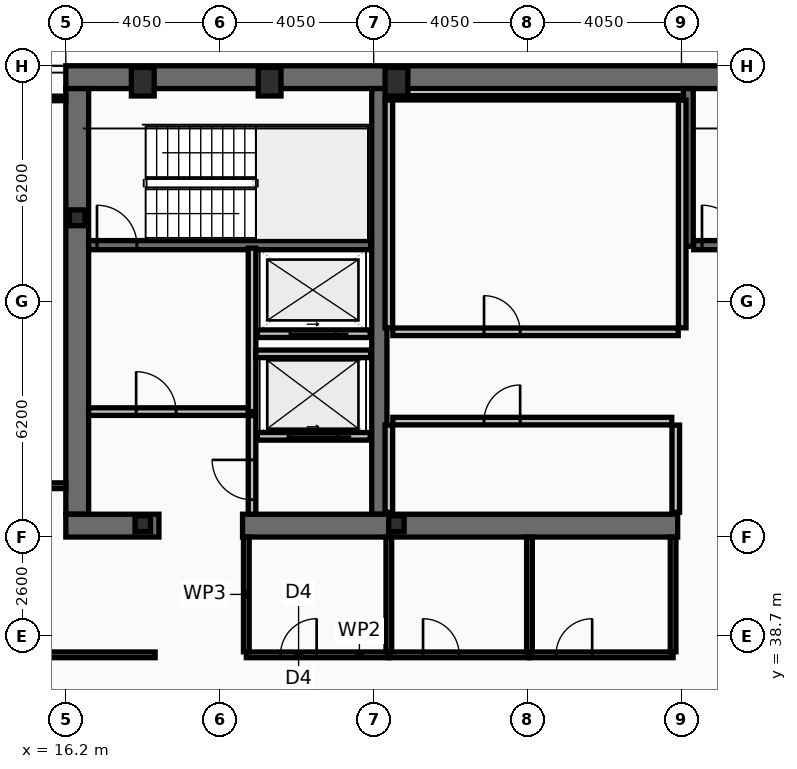
"""IFC4 building model, lengths in metres.
Left out: names, types, materials, properties, quantities, classifications, styles, units other than length and angle.
Written with IfcOpenShell. Run it as: python <this file> out.ifc"""

import sys

from ifc_helpers import new_model, si_unit, direction, frame, frame_2d, origin, origin_2d, place, context, subcontext, project, spatial, rectangle, hollow_rectangle, i_section, extrude, element, fill, save


model = new_model("IFC4")
c1 = context("Model", 3, precision=1e-05, world=origin(), true_north=direction((0.0, 1.0)))
c2 = subcontext(c1, "Body", "Model", "MODEL_VIEW")
j1 = project(units=[si_unit("LENGTHUNIT", "METRE"), si_unit("PLANEANGLEUNIT", "RADIAN")], contexts=[c1])
p1 = place(None, origin())
s1 = spatial("IfcSite", under=j1, at=p1, CompositionType="ELEMENT")
p2 = place(p1, origin())
s2 = spatial("IfcBuilding", under=s1, at=p2, CompositionType="ELEMENT")
p3 = place(p2, frame((0.0, 0.0, 228.2)))
s3 = spatial("IfcBuildingStorey", under=s2, at=p3, CompositionType="ELEMENT", Elevation=228.2)
p4 = place(p3, frame((16.2, 53.4, 0.0), z_axis=(0.0, 0.0, 1.0), x_axis=(1.0, 0.0, 0.0)))
e1 = element("IfcWall", 1, at=p4, inside=s3, PredefinedType="SHEAR", context=c2, shape_type="SweptSolid", body=[
    extrude(rectangle(XDim=40.5, YDim=0.6, at=frame_2d((20.25, 0.0))), origin(), (0.0, 0.0, 1.0), 3.44),
])
p5 = place(p3, frame((16.5, 41.9, 0.0), z_axis=(0.0, 0.0, 1.0), x_axis=(0.0, 1.0, 0.0)))
e2 = element("IfcWall", 2, at=p5, inside=s3, PredefinedType="SHEAR", context=c2, shape_type="SweptSolid", body=[
    extrude(rectangle(XDim=11.2, YDim=0.6, at=frame_2d((5.6, 0.0))), origin(), (0.0, 0.0, 1.0), 3.44),
])
p6 = place(p3, frame((24.45, 41.9, 0.0), z_axis=(0.0, 0.0, 1.0), x_axis=(0.0, 1.0, 0.0)))
e3 = element("IfcWall", 3, at=p6, inside=s3, PredefinedType="SHEAR", context=c2, shape_type="SweptSolid", body=[
    extrude(rectangle(XDim=11.2, YDim=0.4, at=frame_2d((5.6, 0.0))), origin(), (0.0, 0.0, 1.0), 3.44),
])
p7 = place(p3, frame((18.65, 41.6, 0.0), z_axis=(0.0, 0.0, 1.0), x_axis=(-1.0, 0.0, 0.0)))
e4 = element("IfcWall", 4, at=p7, inside=s3, PredefinedType="SHEAR", context=c2, shape_type="SweptSolid", body=[
    extrude(rectangle(XDim=2.45, YDim=0.6, at=frame_2d((1.225, 0.0))), origin(), (0.0, 0.0, 1.0), 3.44),
])
p8 = place(p3, frame((32.3, 41.6, 0.0), z_axis=(0.0, 0.0, 1.0), x_axis=(-1.0, 0.0, 0.0)))
e5 = element("IfcWall", 5, at=p8, inside=s3, PredefinedType="SHEAR", context=c2, shape_type="SweptSolid", body=[
    extrude(rectangle(XDim=11.45, YDim=0.6, at=frame_2d((5.725, 0.0))), origin(), (0.0, 0.0, 1.0), 3.44),
])
p9 = place(p3, frame((32.58, 48.95, 0.0), z_axis=(0.0, 0.0, 1.0), x_axis=(0.0, 1.0, 0.0)))
e6 = element("IfcWall", 6, at=p9, inside=s3, PredefinedType="SHEAR", context=c2, shape_type="SweptSolid", body=[
    extrude(rectangle(XDim=4.15, YDim=0.26, at=frame_2d((2.075, 0.0))), origin(), (0.0, 0.0, 1.0), 3.44),
])
p10 = place(p3, frame((16.8, 48.98, 0.0), z_axis=(0.0, 0.0, 1.0), x_axis=(1.0, 0.0, 0.0)))
e7 = element("IfcWall", 7, at=p10, inside=s3, PredefinedType="SHEAR", context=c2, shape_type="SweptSolid", body=[
    extrude(rectangle(XDim=7.42, YDim=0.24, at=frame_2d((3.71, 0.0))), origin(), (0.0, 0.0, 1.0), 3.44),
])
p11 = place(p10, frame((0.22, 0.0, 0.0)))
e8 = element("IfcOpeningElement", 8, at=p11, cuts=e7, PredefinedType="OPENING", context=c2, shape_type="SweptSolid", body=[
    extrude(rectangle(XDim=1.05, YDim=2.15, at=frame_2d((0.525, 1.075))), frame((0.0, 0.13, 0.0), z_axis=(0.0, -1.0, 0.0), x_axis=(1.0, 0.0, 0.0)), (0.0, 0.0, 1.0), 0.26),
])
p12 = place(p3, frame((32.72, 48.98, 0.0), z_axis=(0.0, 0.0, 1.0), x_axis=(1.0, 0.0, 0.0)))
e9 = element("IfcWall", 9, at=p12, inside=s3, PredefinedType="SHEAR", context=c2, shape_type="SweptSolid", body=[
    extrude(rectangle(XDim=7.56, YDim=0.24, at=frame_2d((3.78, 0.0))), origin(), (0.0, 0.0, 1.0), 3.44),
])
p13 = place(p12, frame((0.22, 0.0, 0.0)))
e10 = element("IfcOpeningElement", 10, at=p13, cuts=e9, PredefinedType="OPENING", context=c2, shape_type="SweptSolid", body=[
    extrude(rectangle(XDim=1.05, YDim=2.15, at=frame_2d((0.525, 1.075))), frame((0.0, 0.13, 0.0), z_axis=(0.0, -1.0, 0.0), x_axis=(1.0, 0.0, 0.0)), (0.0, 0.0, 1.0), 0.26),
])
for number, where, z_axis, x_axis in (
    (11, (18.225, 53.28, 0.0), (0.0, 0.0, 1.0), (1.0, 0.0, 0.0)),
    (12, (21.562, 53.28, 0.0), (0.0, 0.0, 1.0), (1.0, 0.0, 0.0)),
    (13, (24.9, 53.28, 0.0), (0.0, 0.0, 1.0), (1.0, 0.0, 0.0)),
):
    element("IfcColumn", number, at=place(p3, frame(where, z_axis=z_axis, x_axis=x_axis)), inside=s3, PredefinedType="COLUMN", context=c2, shape_type="SweptSolid", body=[
        extrude(hollow_rectangle(XDim=0.6, YDim=0.75, WallThickness=0.045, at=origin_2d()), origin(), (0.0, 0.0, 1.0), 3.6),
    ])
for number, where, z_axis, x_axis in (
    (14, (16.5, 49.7, 0.0), (0.0, 0.0, 1.0), (1.0, 0.0, 0.0)),
    (15, (18.225, 41.65, 0.0), (0.0, 0.0, 1.0), (1.0, 0.0, 0.0)),
    (16, (24.9, 41.65, 0.0), (0.0, 0.0, 1.0), (1.0, 0.0, 0.0)),
):
    element("IfcColumn", number, at=place(p3, frame(where, z_axis=z_axis, x_axis=x_axis)), inside=s3, PredefinedType="COLUMN", context=c2, shape_type="SweptSolid", body=[
        extrude(i_section(OverallWidth=0.406, OverallDepth=0.416, WebThickness=0.03, FlangeThickness=0.048, at=origin_2d()), origin(), (0.0, 0.0, 1.0), 3.6),
    ])
p14 = place(p3, frame((24.21, 43.95, 0.0), z_axis=(0.0, 0.0, 1.0), x_axis=(-1.0, 0.0, 0.0)))
e17 = element("IfcWall", 17, at=p14, inside=s3, PredefinedType="PARTITIONING", context=c2, shape_type="SweptSolid", body=[
    extrude(rectangle(XDim=2.97, YDim=0.2, at=frame_2d((1.485, 0.0))), origin(), (0.0, 0.0, 1.0), 3.44),
])
p15 = place(p14, frame((0.86, 0.0, 0.0)))
e18 = element("IfcOpeningElement", 18, at=p15, cuts=e17, PredefinedType="OPENING", context=c2, shape_type="SweptSolid", body=[
    extrude(rectangle(XDim=1.3, YDim=2.18, at=frame_2d((0.65, 1.09))), frame((0.0, 0.11, 0.0), z_axis=(0.0, -1.0, 0.0), x_axis=(1.0, 0.0, 0.0)), (0.0, 0.0, 1.0), 0.22),
])
p16 = place(p3, frame((24.21, 46.65, 0.0), z_axis=(0.0, 0.0, 1.0), x_axis=(-1.0, 0.0, 0.0)))
e19 = element("IfcWall", 19, at=p16, inside=s3, PredefinedType="PARTITIONING", context=c2, shape_type="SweptSolid", body=[
    extrude(rectangle(XDim=2.97, YDim=0.2, at=frame_2d((1.485, 0.0))), origin(), (0.0, 0.0, 1.0), 3.44),
])
p17 = place(p16, frame((0.91, 0.0, 0.0)))
e20 = element("IfcOpeningElement", 20, at=p17, cuts=e19, PredefinedType="OPENING", context=c2, shape_type="SweptSolid", body=[
    extrude(rectangle(XDim=1.2, YDim=2.18, at=frame_2d((0.6, 1.09))), frame((0.0, 0.11, 0.0), z_axis=(0.0, -1.0, 0.0), x_axis=(1.0, 0.0, 0.0)), (0.0, 0.0, 1.0), 0.22),
])
p18 = place(p3, frame((21.1, 44.6, 0.0), z_axis=(0.0, 0.0, 1.0), x_axis=(0.0, 1.0, 0.0)))
e21 = element("IfcWall", 21, at=p18, inside=s3, PredefinedType="PARTITIONING", context=c2, shape_type="SweptSolid", body=[
    extrude(rectangle(XDim=4.3, YDim=0.2, at=frame_2d((2.15, 0.0))), origin(), (0.0, 0.0, 1.0), 3.44),
])
p19 = place(p3, frame((16.8, 44.6, 0.0), z_axis=(0.0, 0.0, 1.0), x_axis=(1.0, 0.0, 0.0)))
e22 = element("IfcWall", 22, at=p19, inside=s3, PredefinedType="PARTITIONING", context=c2, shape_type="SweptSolid", body=[
    extrude(rectangle(XDim=4.2, YDim=0.2, at=frame_2d((2.1, 0.0))), origin(), (0.0, 0.0, 1.0), 3.44),
])
p20 = place(p19, frame((1.25, 0.0, 0.0)))
e23 = element("IfcOpeningElement", 23, at=p20, cuts=e22, PredefinedType="OPENING", context=c2, shape_type="SweptSolid", body=[
    extrude(rectangle(XDim=1.05, YDim=2.15, at=frame_2d((0.525, 1.075))), frame((0.0, 0.11, 0.0), z_axis=(0.0, -1.0, 0.0), x_axis=(1.0, 0.0, 0.0)), (0.0, 0.0, 1.0), 0.22),
])
p21 = place(p3, frame((21.2, 46.12, 0.0), z_axis=(0.0, 0.0, 1.0), x_axis=(1.0, 0.0, 0.0)))
e24 = element("IfcWall", 24, at=p21, inside=s3, PredefinedType="PARTITIONING", context=c2, shape_type="SweptSolid", body=[
    extrude(rectangle(XDim=3.02, YDim=0.2, at=frame_2d((1.51, 0.0))), origin(), (0.0, 0.0, 1.0), 3.44),
])
p22 = place(p3, frame((21.1, 41.9, 0.0), z_axis=(0.0, 0.0, 1.0), x_axis=(0.0, 1.0, 0.0)))
e25 = element("IfcWall", 25, at=p22, inside=s3, PredefinedType="PARTITIONING", context=c2, shape_type="SweptSolid", body=[
    extrude(rectangle(XDim=2.595, YDim=0.2, at=frame_2d((1.298, 0.0))), origin(), (0.0, 0.0, 1.0), 3.44),
])
p23 = place(p22, frame((0.38, 0.0, 0.0)))
e26 = element("IfcOpeningElement", 26, at=p23, cuts=e25, PredefinedType="OPENING", context=c2, shape_type="SweptSolid", body=[
    extrude(rectangle(XDim=1.05, YDim=2.15, at=frame_2d((0.525, 1.075))), frame((0.0, 0.11, 0.0), z_axis=(0.0, -1.0, 0.0), x_axis=(1.0, 0.0, 0.0)), (0.0, 0.0, 1.0), 0.22),
])
for number, where, z_axis, x_axis in (
    (27, (24.7, 46.805, 0.0), (0.0, 0.0, 1.0), (0.0, 1.0, 0.0)),
    (28, (32.42, 46.805, 0.0), (0.0, 0.0, 1.0), (0.0, 1.0, 0.0)),
):
    element("IfcWall", number, at=place(p3, frame(where, z_axis=z_axis, x_axis=x_axis)), inside=s3, PredefinedType="PARTITIONING", context=c2, shape_type="SweptSolid", body=[
        extrude(rectangle(XDim=5.99, YDim=0.2, at=frame_2d((2.995, 0.0))), origin(), (0.0, 0.0, 1.0), 3.44),
    ])
p24 = place(p3, frame((24.805, 52.86, 0.0), z_axis=(0.0, 0.0, 1.0), x_axis=(1.0, 0.0, 0.0)))
e29 = element("IfcWall", 29, at=p24, inside=s3, PredefinedType="PARTITIONING", context=c2, shape_type="SweptSolid", body=[
    extrude(rectangle(XDim=7.51, YDim=0.12, at=frame_2d((3.755, 0.0))), origin(), (0.0, 0.0, 1.0), 3.44),
])
p25 = place(p3, frame((24.805, 46.7, 0.0), z_axis=(0.0, 0.0, 1.0), x_axis=(1.0, 0.0, 0.0)))
e30 = element("IfcWall", 30, at=p25, inside=s3, PredefinedType="PARTITIONING", context=c2, shape_type="SweptSolid", body=[
    extrude(rectangle(XDim=7.51, YDim=0.2, at=frame_2d((3.755, 0.0))), origin(), (0.0, 0.0, 1.0), 3.44),
])
p26 = place(p25, frame((2.4, 0.0, 0.0)))
e31 = element("IfcOpeningElement", 31, at=p26, cuts=e30, PredefinedType="OPENING", context=c2, shape_type="SweptSolid", body=[
    extrude(rectangle(XDim=0.95, YDim=2.1, at=frame_2d((0.475, 1.05))), frame((0.0, 0.11, 0.0), z_axis=(0.0, -1.0, 0.0), x_axis=(1.0, 0.0, 0.0)), (0.0, 0.0, 1.0), 0.22),
])
for number, where, z_axis, x_axis in (
    (32, (24.7, 41.95, 0.0), (0.0, 0.0, 1.0), (0.0, 1.0, 0.0)),
    (33, (32.25, 41.95, 0.0), (0.0, 0.0, 1.0), (0.0, 1.0, 0.0)),
):
    element("IfcWall", number, at=place(p3, frame(where, z_axis=z_axis, x_axis=x_axis)), inside=s3, PredefinedType="PARTITIONING", context=c2, shape_type="SweptSolid", body=[
        extrude(rectangle(XDim=2.295, YDim=0.2, at=frame_2d((1.147, 0.0))), origin(), (0.0, 0.0, 1.0), 3.44),
    ])
p27 = place(p3, frame((24.805, 44.35, 0.0), z_axis=(0.0, 0.0, 1.0), x_axis=(1.0, 0.0, 0.0)))
e34 = element("IfcWall", 34, at=p27, inside=s3, PredefinedType="PARTITIONING", context=c2, shape_type="SweptSolid", body=[
    extrude(rectangle(XDim=7.34, YDim=0.2, at=frame_2d((3.67, 0.0))), origin(), (0.0, 0.0, 1.0), 3.44),
])
p28 = place(p27, frame((2.4, 0.0, 0.0)))
e35 = element("IfcOpeningElement", 35, at=p28, cuts=e34, PredefinedType="OPENING", context=c2, shape_type="SweptSolid", body=[
    extrude(rectangle(XDim=0.95, YDim=2.1, at=frame_2d((0.475, 1.05))), frame((0.0, 0.11, 0.0), z_axis=(0.0, -1.0, 0.0), x_axis=(1.0, 0.0, 0.0)), (0.0, 0.0, 1.0), 0.22),
])
p29 = place(p3, frame((20.95, 38.2, 0.0), z_axis=(0.0, 0.0, 1.0), x_axis=(1.0, 0.0, 0.0)))
e36 = element("IfcWall", 36, at=p29, inside=s3, PredefinedType="PARTITIONING", context=c2, shape_type="SweptSolid", body=[
    extrude(rectangle(XDim=3.75, YDim=0.15, at=frame_2d((1.875, 0.0))), origin(), (0.0, 0.0, 1.0), 2.78),
])
p30 = place(p29, frame((0.9, 0.0, 0.0)))
e37 = element("IfcOpeningElement", 37, at=p30, cuts=e36, PredefinedType="OPENING", context=c2, shape_type="SweptSolid", body=[
    extrude(rectangle(XDim=0.95, YDim=2.05, at=frame_2d((0.475, 1.025))), frame((0.0, 0.085, 0.0), z_axis=(0.0, -1.0, 0.0), x_axis=(1.0, 0.0, 0.0)), (0.0, 0.0, 1.0), 0.17),
])
p31 = place(p3, frame((24.7, 38.2, 0.0), z_axis=(0.0, 0.0, 1.0), x_axis=(1.0, 0.0, 0.0)))
e38 = element("IfcWall", 38, at=p31, inside=s3, PredefinedType="PARTITIONING", context=c2, shape_type="SweptSolid", body=[
    extrude(rectangle(XDim=3.7, YDim=0.15, at=frame_2d((1.85, 0.0))), origin(), (0.0, 0.0, 1.0), 2.78),
])
p32 = place(p31, frame((0.9, 0.0, 0.0)))
e39 = element("IfcOpeningElement", 39, at=p32, cuts=e38, PredefinedType="OPENING", context=c2, shape_type="SweptSolid", body=[
    extrude(rectangle(XDim=0.95, YDim=2.05, at=frame_2d((0.475, 1.025))), frame((0.0, 0.085, 0.0), z_axis=(0.0, -1.0, 0.0), x_axis=(1.0, 0.0, 0.0)), (0.0, 0.0, 1.0), 0.17),
])
p33 = place(p3, frame((28.4, 38.2, 0.0), z_axis=(0.0, 0.0, 1.0), x_axis=(1.0, 0.0, 0.0)))
e40 = element("IfcWall", 40, at=p33, inside=s3, PredefinedType="PARTITIONING", context=c2, shape_type="SweptSolid", body=[
    extrude(rectangle(XDim=3.78, YDim=0.15, at=frame_2d((1.89, 0.0))), origin(), (0.0, 0.0, 1.0), 2.78),
])
p34 = place(p33, frame((0.7, 0.0, 0.0)))
e41 = element("IfcOpeningElement", 41, at=p34, cuts=e40, PredefinedType="OPENING", context=c2, shape_type="SweptSolid", body=[
    extrude(rectangle(XDim=0.95, YDim=2.05, at=frame_2d((0.475, 1.025))), frame((0.0, 0.085, 0.0), z_axis=(0.0, -1.0, 0.0), x_axis=(1.0, 0.0, 0.0)), (0.0, 0.0, 1.0), 0.17),
])
p35 = place(p3, frame((20.95, 38.28, 0.0), z_axis=(0.0, 0.0, 1.0), x_axis=(0.0, 1.0, 0.0)))
e42 = element("IfcWall", 42, at=p35, inside=s3, PredefinedType="PARTITIONING", context=c2, shape_type="SweptSolid", body=[
    extrude(rectangle(XDim=3.02, YDim=0.15, at=frame_2d((1.51, 0.0))), origin(), (0.0, 0.0, 1.0), 3.44),
])
p36 = place(p3, frame((24.7, 38.28, 0.0), z_axis=(0.0, 0.0, 1.0), x_axis=(0.0, 1.0, 0.0)))
e43 = element("IfcWall", 43, at=p36, inside=s3, PredefinedType="PARTITIONING", context=c2, shape_type="SweptSolid", body=[
    extrude(rectangle(XDim=3.02, YDim=0.15, at=frame_2d((1.51, 0.0))), origin(), (0.0, 0.0, 1.0), 2.78),
])
for number, where, z_axis, x_axis in (
    (44, (28.4, 38.28, 0.0), (0.0, 0.0, 1.0), (0.0, 1.0, 0.0)),
    (45, (32.18, 38.28, 0.0), (0.0, 0.0, 1.0), (0.0, 1.0, 0.0)),
):
    element("IfcWall", number, at=place(p3, frame(where, z_axis=z_axis, x_axis=x_axis)), inside=s3, PredefinedType="PARTITIONING", context=c2, shape_type="SweptSolid", body=[
        extrude(rectangle(XDim=3.02, YDim=0.15, at=frame_2d((1.51, 0.0))), origin(), (0.0, 0.0, 1.0), 3.44),
    ])
p37 = place(p3, frame((8.03, 38.2, 0.0), z_axis=(0.0, 0.0, 1.0), x_axis=(1.0, 0.0, 0.0)))
e46 = element("IfcWall", 46, at=p37, inside=s3, PredefinedType="PARTITIONING", context=c2, shape_type="SweptSolid", body=[
    extrude(rectangle(XDim=10.52, YDim=0.15, at=frame_2d((5.26, 0.0))), origin(), (0.0, 0.0, 1.0), 2.78),
])
p38 = place(p37, frame((6.32, 0.0, 0.0)))
e47 = element("IfcOpeningElement", 47, at=p38, cuts=e46, PredefinedType="OPENING", context=c2, shape_type="SweptSolid", body=[
    extrude(rectangle(XDim=0.95, YDim=2.05, at=frame_2d((0.475, 1.025))), frame((0.0, 0.085, 0.0), z_axis=(0.0, -1.0, 0.0), x_axis=(1.0, 0.0, 0.0)), (0.0, 0.0, 1.0), 0.17),
])
p39 = place(p3, frame((8.095, 42.65, 0.0), z_axis=(0.0, 0.0, 1.0), x_axis=(1.0, 0.0, 0.0)))
e48 = element("IfcWall", 48, at=p39, inside=s3, PredefinedType="PARTITIONING", context=c2, shape_type="SweptSolid", body=[
    extrude(rectangle(XDim=8.105, YDim=0.15, at=frame_2d((4.052, 0.0))), origin(), (0.0, 0.0, 1.0), 2.78),
])
p40 = place(p39, frame((6.32, 0.0, 0.0)))
e49 = element("IfcOpeningElement", 49, at=p40, cuts=e48, PredefinedType="OPENING", context=c2, shape_type="SweptSolid", body=[
    extrude(rectangle(XDim=0.9, YDim=2.05, at=frame_2d((0.45, 1.025))), frame((0.0, 0.085, 0.0), z_axis=(0.0, -1.0, 0.0), x_axis=(1.0, 0.0, 0.0)), (0.0, 0.0, 1.0), 0.17),
])
p41 = place(p3, frame((8.095, 52.84, 0.0), z_axis=(0.0, 0.0, 1.0), x_axis=(1.0, 0.0, 0.0)))
e50 = element("IfcWall", 50, at=p41, inside=s3, PredefinedType="PARTITIONING", context=c2, shape_type="SweptSolid", body=[
    extrude(rectangle(XDim=8.105, YDim=0.12, at=frame_2d((4.052, 0.0))), origin(), (0.0, 0.0, 1.0), 3.44),
])
p42 = place(p11, origin())
e51 = element("IfcDoor", 51, at=p42, inside=s3, OperationType="SINGLE_SWING_LEFT", PredefinedType="DOOR", context=c2, shape_type="SweptSolid", body=[
    extrude(rectangle(XDim=1.05, YDim=2.15, at=frame_2d((0.525, 1.075))), frame((0.0, 0.025, 0.0), z_axis=(0.0, -1.0, 0.0), x_axis=(1.0, 0.0, 0.0)), (0.0, 0.0, 1.0), 0.05),
])
fill(e8, e51)
p43 = place(p13, origin())
e52 = element("IfcDoor", 52, at=p43, inside=s3, OperationType="SINGLE_SWING_LEFT", PredefinedType="DOOR", context=c2, shape_type="SweptSolid", body=[
    extrude(rectangle(XDim=1.05, YDim=2.15, at=frame_2d((0.525, 1.075))), frame((0.0, 0.025, 0.0), z_axis=(0.0, -1.0, 0.0), x_axis=(1.0, 0.0, 0.0)), (0.0, 0.0, 1.0), 0.05),
])
fill(e10, e52)
p44 = place(p15, origin())
e53 = element("IfcDoor", 53, at=p44, inside=s3, OperationType="SLIDING_TO_LEFT", PredefinedType="DOOR", context=c2, shape_type="SweptSolid", body=[
    extrude(rectangle(XDim=1.3, YDim=2.18, at=frame_2d((0.65, 1.09))), frame((0.0, 0.025, 0.0), z_axis=(0.0, -1.0, 0.0), x_axis=(1.0, 0.0, 0.0)), (0.0, 0.0, 1.0), 0.05),
])
fill(e18, e53)
p45 = place(p17, origin())
e54 = element("IfcDoor", 54, at=p45, inside=s3, OperationType="SLIDING_TO_LEFT", PredefinedType="DOOR", context=c2, shape_type="SweptSolid", body=[
    extrude(rectangle(XDim=1.2, YDim=2.18, at=frame_2d((0.6, 1.09))), frame((0.0, 0.025, 0.0), z_axis=(0.0, -1.0, 0.0), x_axis=(1.0, 0.0, 0.0)), (0.0, 0.0, 1.0), 0.05),
])
fill(e20, e54)
p46 = place(p20, origin())
e55 = element("IfcDoor", 55, at=p46, inside=s3, OperationType="SINGLE_SWING_LEFT", PredefinedType="DOOR", context=c2, shape_type="SweptSolid", body=[
    extrude(rectangle(XDim=1.05, YDim=2.15, at=frame_2d((0.525, 1.075))), frame((0.0, 0.025, 0.0), z_axis=(0.0, -1.0, 0.0), x_axis=(1.0, 0.0, 0.0)), (0.0, 0.0, 1.0), 0.05),
])
fill(e23, e55)
p47 = place(p23, origin())
e56 = element("IfcDoor", 56, at=p47, inside=s3, OperationType="SINGLE_SWING_RIGHT", PredefinedType="DOOR", context=c2, shape_type="SweptSolid", body=[
    extrude(rectangle(XDim=1.05, YDim=2.15, at=frame_2d((0.525, 1.075))), frame((0.0, 0.025, 0.0), z_axis=(0.0, -1.0, 0.0), x_axis=(1.0, 0.0, 0.0)), (0.0, 0.0, 1.0), 0.05),
])
fill(e26, e56)
p48 = place(p26, origin())
e57 = element("IfcDoor", 57, at=p48, inside=s3, OperationType="SINGLE_SWING_LEFT", PredefinedType="DOOR", context=c2, shape_type="SweptSolid", body=[
    extrude(rectangle(XDim=0.95, YDim=2.1, at=frame_2d((0.475, 1.05))), frame((0.0, 0.025, 0.0), z_axis=(0.0, -1.0, 0.0), x_axis=(1.0, 0.0, 0.0)), (0.0, 0.0, 1.0), 0.05),
])
fill(e31, e57)
p49 = place(p28, origin())
e58 = element("IfcDoor", 58, at=p49, inside=s3, OperationType="SINGLE_SWING_RIGHT", PredefinedType="DOOR", context=c2, shape_type="SweptSolid", body=[
    extrude(rectangle(XDim=0.95, YDim=2.1, at=frame_2d((0.475, 1.05))), frame((0.0, 0.025, 0.0), z_axis=(0.0, -1.0, 0.0), x_axis=(1.0, 0.0, 0.0)), (0.0, 0.0, 1.0), 0.05),
])
fill(e35, e58)
p50 = place(p30, origin())
e59 = element("IfcDoor", 59, at=p50, inside=s3, OperationType="SINGLE_SWING_RIGHT", PredefinedType="DOOR", context=c2, shape_type="SweptSolid", body=[
    extrude(rectangle(XDim=0.95, YDim=2.05, at=frame_2d((0.475, 1.025))), frame((0.0, 0.025, 0.0), z_axis=(0.0, -1.0, 0.0), x_axis=(1.0, 0.0, 0.0)), (0.0, 0.0, 1.0), 0.05),
])
fill(e37, e59)
p51 = place(p32, origin())
e60 = element("IfcDoor", 60, at=p51, inside=s3, OperationType="SINGLE_SWING_LEFT", PredefinedType="DOOR", context=c2, shape_type="SweptSolid", body=[
    extrude(rectangle(XDim=0.95, YDim=2.05, at=frame_2d((0.475, 1.025))), frame((0.0, 0.025, 0.0), z_axis=(0.0, -1.0, 0.0), x_axis=(1.0, 0.0, 0.0)), (0.0, 0.0, 1.0), 0.05),
])
fill(e39, e60)
p52 = place(p34, origin())
e61 = element("IfcDoor", 61, at=p52, inside=s3, OperationType="SINGLE_SWING_RIGHT", PredefinedType="DOOR", context=c2, shape_type="SweptSolid", body=[
    extrude(rectangle(XDim=0.95, YDim=2.05, at=frame_2d((0.475, 1.025))), frame((0.0, 0.025, 0.0), z_axis=(0.0, -1.0, 0.0), x_axis=(1.0, 0.0, 0.0)), (0.0, 0.0, 1.0), 0.05),
])
fill(e41, e61)
save(model, sys.argv[1])
